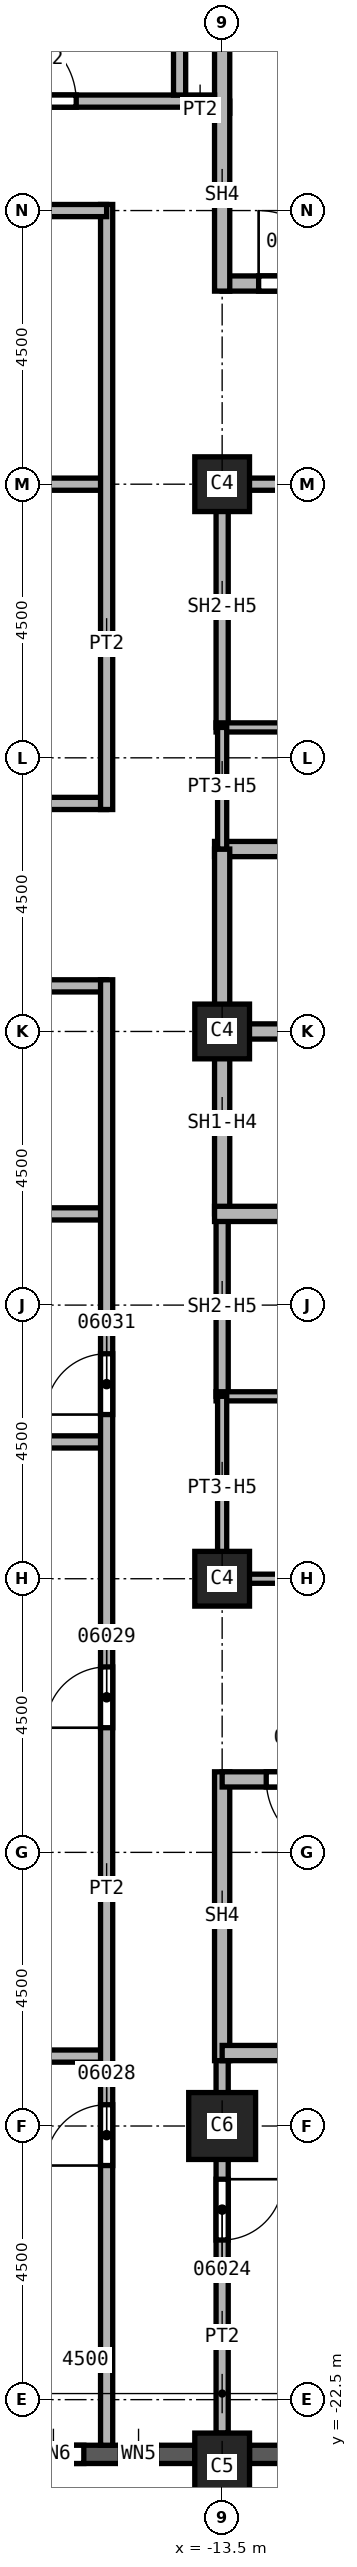
"""IFC4 building model, lengths in metres.
Left out: names, types, materials, properties, quantities, classifications, styles, units other than length and angle.
Written with IfcOpenShell. Run it as: python <this file> out.ifc"""

import sys

from ifc_helpers import new_model, si_unit, direction, frame, frame_2d, origin, origin_2d, place, context, subcontext, project, spatial, rectangle, extrude, element, fill, save


model = new_model("IFC4")
c1 = context("Model", 3, precision=1e-05, world=origin(), true_north=direction((0.0, 1.0)))
c2 = subcontext(c1, "Body", "Model", "MODEL_VIEW")
j1 = project(units=[si_unit("LENGTHUNIT", "METRE"), si_unit("PLANEANGLEUNIT", "RADIAN")], contexts=[c1])
p1 = place(None, origin())
s1 = spatial("IfcSite", under=j1, at=p1, CompositionType="ELEMENT")
p2 = place(p1, origin())
s2 = spatial("IfcBuilding", under=s1, at=p2, CompositionType="ELEMENT")
p3 = place(p2, frame((0.0, 0.0, 126.0)))
s3 = spatial("IfcBuildingStorey", under=s2, at=p3, CompositionType="ELEMENT", Elevation=126.0)
p4 = place(p3, frame((-13.5, -18.0, 0.0), z_axis=(0.0, 0.0, 1.0), x_axis=(1.0, 0.0, 0.0)))
e1 = element("IfcColumn", 1, at=p4, inside=s3, PredefinedType="COLUMN", context=c2, shape_type="SweptSolid", body=[
    extrude(rectangle(XDim=1.1, YDim=1.1, at=origin_2d()), origin(), (0.0, 0.0, 1.0), 3.7),
])
for number, where, z_axis, x_axis in (
    (2, (-13.5, 0.0, 0.0), (0.0, 0.0, 1.0), (1.0, 0.0, 0.0)),
    (3, (-13.5, 9.0, 0.0), (0.0, 0.0, 1.0), (1.0, 0.0, 0.0)),
    (4, (-13.5, -9.0, 0.0), (0.0, 0.0, 1.0), (1.0, 0.0, 0.0)),
):
    element("IfcColumn", number, at=place(p3, frame(where, z_axis=z_axis, x_axis=x_axis)), inside=s3, PredefinedType="COLUMN", context=c2, shape_type="SweptSolid", body=[
        extrude(rectangle(XDim=0.9, YDim=0.9, at=origin_2d()), origin(), (0.0, 0.0, 1.0), 3.7),
    ])
p5 = place(p3, frame((-13.5, -23.6, 0.0), z_axis=(0.0, 0.0, 1.0), x_axis=(1.0, 0.0, 0.0)))
e5 = element("IfcColumn", 5, at=p5, inside=s3, PredefinedType="COLUMN", context=c2, shape_type="SweptSolid", body=[
    extrude(rectangle(XDim=0.9, YDim=1.1, at=origin_2d()), origin(), (0.0, 0.0, 1.0), 3.7),
])
p6 = place(p3, frame((-17.55, -23.4, 0.0), z_axis=(0.0, 0.0, 1.0), x_axis=(1.0, 0.0, 0.0)))
e6 = element("IfcWall", 6, at=p6, inside=s3, PredefinedType="SOLIDWALL", context=c2, shape_type="SweptSolid", body=[
    extrude(rectangle(XDim=3.6, YDim=0.3, at=frame_2d((1.8, 0.0))), origin(), (0.0, 0.0, 1.0), 3.1),
])
p7 = place(p6, frame((0.775, 0.0, 0.8)))
e7 = element("IfcOpeningElement", 7, at=p7, cuts=e6, PredefinedType="OPENING", context=c2, shape_type="SweptSolid", body=[
    extrude(rectangle(XDim=1.0, YDim=1.95, at=frame_2d((0.5, 0.975))), frame((0.0, 0.15, 0.0), z_axis=(0.0, -1.0, 0.0), x_axis=(1.0, 0.0, 0.0)), (0.0, 0.0, 1.0), 0.3),
])
p8 = place(p6, frame((2.375, 0.0, 0.8)))
e8 = element("IfcOpeningElement", 8, at=p8, cuts=e6, PredefinedType="OPENING", context=c2, shape_type="SweptSolid", body=[
    extrude(rectangle(XDim=0.6, YDim=1.95, at=frame_2d((0.3, 0.975))), frame((0.0, 0.15, 0.0), z_axis=(0.0, -1.0, 0.0), x_axis=(1.0, 0.0, 0.0)), (0.0, 0.0, 1.0), 0.3),
])
p9 = place(p3, frame((-13.05, -23.4, 0.0), z_axis=(0.0, 0.0, 1.0), x_axis=(1.0, 0.0, 0.0)))
e9 = element("IfcWall", 9, at=p9, inside=s3, PredefinedType="SOLIDWALL", context=c2, shape_type="SweptSolid", body=[
    extrude(rectangle(XDim=3.6, YDim=0.3, at=frame_2d((1.8, 0.0))), origin(), (0.0, 0.0, 1.0), 3.1),
])
p10 = place(p9, frame((0.6, 0.0, 0.8)))
e10 = element("IfcOpeningElement", 10, at=p10, cuts=e9, PredefinedType="OPENING", context=c2, shape_type="SweptSolid", body=[
    extrude(rectangle(XDim=2.4, YDim=1.95, at=frame_2d((1.2, 0.975))), frame((0.0, 0.15, 0.0), z_axis=(0.0, -1.0, 0.0), x_axis=(1.0, 0.0, 0.0)), (0.0, 0.0, 1.0), 0.3),
])
p11 = place(p3, frame((-33.85, 3.75, 0.0), z_axis=(0.0, 0.0, 1.0), x_axis=(1.0, 0.0, 0.0)))
e11 = element("IfcWall", 11, at=p11, inside=s3, PredefinedType="PARTITIONING", context=c2, shape_type="SweptSolid", body=[
    extrude(rectangle(XDim=18.45, YDim=0.2, at=frame_2d((9.225, 0.0))), origin(), (0.0, 0.0, 1.0), 3.7),
])
p12 = place(p11, frame((9.4, 0.0, 0.0)))
e12 = element("IfcOpeningElement", 12, at=p12, cuts=e11, PredefinedType="OPENING", context=c2, shape_type="SweptSolid", body=[
    extrude(rectangle(XDim=1.0, YDim=2.1, at=frame_2d((0.5, 1.05))), frame((0.0, 0.1, 0.0), z_axis=(0.0, -1.0, 0.0), x_axis=(1.0, 0.0, 0.0)), (0.0, 0.0, 1.0), 0.2),
])
p13 = place(p3, frame((-15.4, 0.75, 0.0), z_axis=(0.0, 0.0, 1.0), x_axis=(-1.0, 0.0, 0.0)))
e13 = element("IfcWall", 13, at=p13, inside=s3, PredefinedType="PARTITIONING", context=c2, shape_type="SweptSolid", body=[
    extrude(rectangle(XDim=18.45, YDim=0.2, at=frame_2d((9.225, 0.0))), origin(), (0.0, 0.0, 1.0), 3.7),
])
p14 = place(p13, frame((3.55, 0.0, 0.0)))
e14 = element("IfcOpeningElement", 14, at=p14, cuts=e13, PredefinedType="OPENING", context=c2, shape_type="SweptSolid", body=[
    extrude(rectangle(XDim=1.0, YDim=2.1, at=frame_2d((0.5, 1.05))), frame((0.0, 0.1, 0.0), z_axis=(0.0, -1.0, 0.0), x_axis=(1.0, 0.0, 0.0)), (0.0, 0.0, 1.0), 0.2),
])
p15 = place(p13, frame((14.9, 0.0, 0.0)))
e15 = element("IfcOpeningElement", 15, at=p15, cuts=e13, PredefinedType="OPENING", context=c2, shape_type="SweptSolid", body=[
    extrude(rectangle(XDim=1.0, YDim=2.1, at=frame_2d((0.5, 1.05))), frame((0.0, 0.1, 0.0), z_axis=(0.0, -1.0, 0.0), x_axis=(1.0, 0.0, 0.0)), (0.0, 0.0, 1.0), 0.2),
])
for number, where, z_axis, x_axis in (
    (16, (-27.1, -6.75, 0.0), (0.0, 0.0, 1.0), (1.0, 0.0, 0.0)),
    (17, (-27.1, -3.0, 0.0), (0.0, 0.0, 1.0), (1.0, 0.0, 0.0)),
    (18, (-27.1, 9.0, 0.0), (0.0, 0.0, 1.0), (1.0, 0.0, 0.0)),
):
    element("IfcWall", number, at=place(p3, frame(where, z_axis=z_axis, x_axis=x_axis)), inside=s3, PredefinedType="PARTITIONING", context=c2, shape_type="SweptSolid", body=[
        extrude(rectangle(XDim=11.7, YDim=0.2, at=frame_2d((5.85, 0.0))), origin(), (0.0, 0.0, 1.0), 3.7),
    ])
p16 = place(p3, frame((-20.0, -16.85, 0.0), z_axis=(0.0, 0.0, 1.0), x_axis=(1.0, 0.0, 0.0)))
e19 = element("IfcWall", 19, at=p16, inside=s3, PredefinedType="PARTITIONING", context=c2, shape_type="SweptSolid", body=[
    extrude(rectangle(XDim=4.6, YDim=0.2, at=frame_2d((2.3, 0.0))), origin(), (0.0, 0.0, 1.0), 3.7),
])
p17 = place(p3, frame((-15.4, -23.25, 0.0), z_axis=(0.0, 0.0, 1.0), x_axis=(0.0, 1.0, 0.0)))
e20 = element("IfcWall", 20, at=p17, inside=s3, PredefinedType="PARTITIONING", context=c2, shape_type="SweptSolid", body=[
    extrude(rectangle(XDim=24.1, YDim=0.2, at=frame_2d((12.05, 0.0))), origin(), (0.0, 0.0, 1.0), 3.7),
])
p18 = place(p17, frame((4.6, 0.0, 0.0)))
e21 = element("IfcOpeningElement", 21, at=p18, cuts=e20, PredefinedType="OPENING", context=c2, shape_type="SweptSolid", body=[
    extrude(rectangle(XDim=1.0, YDim=2.1, at=frame_2d((0.5, 1.05))), frame((0.0, 0.1, 0.0), z_axis=(0.0, -1.0, 0.0), x_axis=(1.0, 0.0, 0.0)), (0.0, 0.0, 1.0), 0.2),
])
p19 = place(p17, frame((11.8, 0.0, 0.0)))
e22 = element("IfcOpeningElement", 22, at=p19, cuts=e20, PredefinedType="OPENING", context=c2, shape_type="SweptSolid", body=[
    extrude(rectangle(XDim=1.0, YDim=2.1, at=frame_2d((0.5, 1.05))), frame((0.0, 0.1, 0.0), z_axis=(0.0, -1.0, 0.0), x_axis=(1.0, 0.0, 0.0)), (0.0, 0.0, 1.0), 0.2),
])
p20 = place(p17, frame((16.95, 0.0, 0.0)))
e23 = element("IfcOpeningElement", 23, at=p20, cuts=e20, PredefinedType="OPENING", context=c2, shape_type="SweptSolid", body=[
    extrude(rectangle(XDim=1.0, YDim=2.1, at=frame_2d((0.5, 1.05))), frame((0.0, 0.1, 0.0), z_axis=(0.0, -1.0, 0.0), x_axis=(1.0, 0.0, 0.0)), (0.0, 0.0, 1.0), 0.2),
])
p21 = place(p3, frame((-15.4, 3.65, 0.0), z_axis=(0.0, 0.0, 1.0), x_axis=(0.0, 1.0, 0.0)))
e24 = element("IfcWall", 24, at=p21, inside=s3, PredefinedType="PARTITIONING", context=c2, shape_type="SweptSolid", body=[
    extrude(rectangle(XDim=9.95, YDim=0.2, at=frame_2d((4.975, 0.0))), origin(), (0.0, 0.0, 1.0), 3.7),
])
p22 = place(p3, frame((-15.4, 13.5, 0.0), z_axis=(0.0, 0.0, 1.0), x_axis=(-1.0, 0.0, 0.0)))
e25 = element("IfcWall", 25, at=p22, inside=s3, PredefinedType="PARTITIONING", context=c2, shape_type="SweptSolid", body=[
    extrude(rectangle(XDim=6.6, YDim=0.2, at=frame_2d((3.3, 0.0))), origin(), (0.0, 0.0, 1.0), 3.7),
])
p23 = place(p22, frame((5.35, 0.0, 0.0)))
e26 = element("IfcOpeningElement", 26, at=p23, cuts=e25, PredefinedType="OPENING", context=c2, shape_type="SweptSolid", body=[
    extrude(rectangle(XDim=1.0, YDim=2.1, at=frame_2d((0.5, 1.05))), frame((0.0, 0.1, 0.0), z_axis=(0.0, -1.0, 0.0), x_axis=(1.0, 0.0, 0.0)), (0.0, 0.0, 1.0), 0.2),
])
p24 = place(p3, frame((-14.1, 15.2, 0.0), z_axis=(0.0, 0.0, 1.0), x_axis=(1.0, 0.0, 0.0)))
e27 = element("IfcWall", 27, at=p24, inside=s3, PredefinedType="PARTITIONING", context=c2, shape_type="SweptSolid", body=[
    extrude(rectangle(XDim=0.725, YDim=0.2, at=frame_2d((0.363, 0.0))), origin(), (0.0, 0.0, 1.0), 3.7),
])
p25 = place(p3, frame((-13.5, -16.675, 0.0), z_axis=(0.0, 0.0, 1.0), x_axis=(0.0, -1.0, 0.0)))
e28 = element("IfcWall", 28, at=p25, inside=s3, PredefinedType="PARTITIONING", context=c2, shape_type="SweptSolid", body=[
    extrude(rectangle(XDim=6.375, YDim=0.2, at=frame_2d((3.188, 0.0))), origin(), (0.0, 0.0, 1.0), 3.7),
])
p26 = place(p25, frame((2.2, 0.0, 0.0)))
e29 = element("IfcOpeningElement", 29, at=p26, cuts=e28, PredefinedType="OPENING", context=c2, shape_type="SweptSolid", body=[
    extrude(rectangle(XDim=1.0, YDim=2.1, at=frame_2d((0.5, 1.05))), frame((0.0, 0.1, 0.0), z_axis=(0.0, -1.0, 0.0), x_axis=(1.0, 0.0, 0.0)), (0.0, 0.0, 1.0), 0.2),
])
p27 = place(p3, frame((-13.5, -6.0, 0.0), z_axis=(0.0, 0.0, 1.0), x_axis=(0.0, 1.0, 0.0)))
e30 = element("IfcWall", 30, at=p27, inside=s3, PredefinedType="SOLIDWALL", context=c2, shape_type="SweptSolid", body=[
    extrude(rectangle(XDim=3.0, YDim=0.2, at=frame_2d((1.5, 0.0))), origin(), (0.0, 0.0, 1.0), 2.938),
])
p28 = place(p3, frame((-13.5, 5.0, 0.0), z_axis=(0.0, 0.0, 1.0), x_axis=(0.0, 1.0, 0.0)))
e31 = element("IfcWall", 31, at=p28, inside=s3, PredefinedType="SOLIDWALL", context=c2, shape_type="SweptSolid", body=[
    extrude(rectangle(XDim=4.1, YDim=0.2, at=frame_2d((2.05, 0.0))), origin(), (0.0, 0.0, 1.0), 2.938),
])
p29 = place(p3, frame((-13.5, 9.0, 0.0), z_axis=(0.0, 0.0, 1.0), x_axis=(1.0, 0.0, 0.0)))
e32 = element("IfcWall", 32, at=p29, inside=s3, PredefinedType="SOLIDWALL", context=c2, shape_type="SweptSolid", body=[
    extrude(rectangle(XDim=3.0, YDim=0.2, at=frame_2d((1.5, 0.0))), origin(), (0.0, 0.0, 1.0), 2.938),
])
p30 = place(p3, frame((-13.625, 0.0, 0.0), z_axis=(0.0, 0.0, 1.0), x_axis=(1.0, 0.0, 0.0)))
e33 = element("IfcWall", 33, at=p30, inside=s3, PredefinedType="SOLIDWALL", context=c2, shape_type="SweptSolid", body=[
    extrude(rectangle(XDim=3.125, YDim=0.25, at=frame_2d((1.562, 0.0))), origin(), (0.0, 0.0, 1.0), 3.7),
])
p31 = place(p3, frame((-13.625, 3.0, 0.0), z_axis=(0.0, 0.0, 1.0), x_axis=(1.0, 0.0, 0.0)))
e34 = element("IfcWall", 34, at=p31, inside=s3, PredefinedType="SOLIDWALL", context=c2, shape_type="SweptSolid", body=[
    extrude(rectangle(XDim=6.125, YDim=0.25, at=frame_2d((3.062, 0.0))), origin(), (0.0, 0.0, 1.0), 3.7),
])
p32 = place(p31, frame((3.25, 0.0, 0.0)))
e35 = element("IfcOpeningElement", 35, at=p32, cuts=e34, PredefinedType="OPENING", context=c2, shape_type="SweptSolid", body=[
    extrude(rectangle(XDim=1.1, YDim=2.1, at=frame_2d((0.55, 1.05))), frame((0.0, 0.125, 0.0), z_axis=(0.0, -1.0, 0.0), x_axis=(1.0, 0.0, 0.0)), (0.0, 0.0, 1.0), 0.25),
])
p33 = place(p3, frame((-13.5, -3.0, 0.0), z_axis=(0.0, 0.0, 1.0), x_axis=(0.0, 1.0, 0.0)))
e36 = element("IfcWall", 36, at=p33, inside=s3, PredefinedType="SOLIDWALL", context=c2, shape_type="SweptSolid", body=[
    extrude(rectangle(XDim=6.0, YDim=0.25, at=frame_2d((3.0, 0.0))), origin(), (0.0, 0.0, 1.0), 2.938),
])
p34 = place(p3, frame((-13.625, -3.0, 0.0), z_axis=(0.0, 0.0, 1.0), x_axis=(1.0, 0.0, 0.0)))
e37 = element("IfcWall", 37, at=p34, inside=s3, PredefinedType="SOLIDWALL", context=c2, shape_type="SweptSolid", body=[
    extrude(rectangle(XDim=9.25, YDim=0.25, at=frame_2d((4.625, 0.0))), origin(), (0.0, 0.0, 1.0), 3.7),
])
p35 = place(p34, frame((3.25, 0.0, 0.0)))
e38 = element("IfcOpeningElement", 38, at=p35, cuts=e37, PredefinedType="OPENING", context=c2, shape_type="SweptSolid", body=[
    extrude(rectangle(XDim=1.1, YDim=2.1, at=frame_2d((0.55, 1.05))), frame((0.0, 0.125, 0.0), z_axis=(0.0, -1.0, 0.0), x_axis=(1.0, 0.0, 0.0)), (0.0, 0.0, 1.0), 0.25),
])
p36 = place(p3, frame((-13.5, -12.175, 0.0), z_axis=(0.0, 0.0, 1.0), x_axis=(0.0, -1.0, 0.0)))
e39 = element("IfcWall", 39, at=p36, inside=s3, PredefinedType="SOLIDWALL", context=c2, shape_type="SweptSolid", body=[
    extrude(rectangle(XDim=4.75, YDim=0.25, at=frame_2d((2.375, 0.0))), origin(), (0.0, 0.0, 1.0), 3.7),
])
p37 = place(p3, frame((-13.5, 12.3, 0.0), z_axis=(0.0, 0.0, 1.0), x_axis=(1.0, 0.0, 0.0)))
e40 = element("IfcWall", 40, at=p37, inside=s3, PredefinedType="SOLIDWALL", context=c2, shape_type="SweptSolid", body=[
    extrude(rectangle(XDim=9.125, YDim=0.25, at=frame_2d((4.562, 0.0))), origin(), (0.0, 0.0, 1.0), 3.7),
])
p38 = place(p37, frame((0.6, 0.0, 0.0)))
e41 = element("IfcOpeningElement", 41, at=p38, cuts=e40, PredefinedType="OPENING", context=c2, shape_type="SweptSolid", body=[
    extrude(rectangle(XDim=1.2, YDim=2.1, at=frame_2d((0.6, 1.05))), frame((0.0, 0.125, 0.0), z_axis=(0.0, -1.0, 0.0), x_axis=(1.0, 0.0, 0.0)), (0.0, 0.0, 1.0), 0.25),
])
p39 = place(p3, frame((-13.5, 12.175, 0.0), z_axis=(0.0, 0.0, 1.0), x_axis=(0.0, 1.0, 0.0)))
e42 = element("IfcWall", 42, at=p39, inside=s3, PredefinedType="SOLIDWALL", context=c2, shape_type="SweptSolid", body=[
    extrude(rectangle(XDim=4.75, YDim=0.25, at=frame_2d((2.375, 0.0))), origin(), (0.0, 0.0, 1.0), 3.7),
])
p40 = place(p3, frame((-4.5, -16.8, 0.0), z_axis=(0.0, 0.0, 1.0), x_axis=(-1.0, 0.0, 0.0)))
e43 = element("IfcWall", 43, at=p40, inside=s3, PredefinedType="SOLIDWALL", context=c2, shape_type="SweptSolid", body=[
    extrude(rectangle(XDim=9.0, YDim=0.25, at=frame_2d((4.5, 0.0))), origin(), (0.0, 0.0, 1.0), 3.7),
])
p41 = place(p3, frame((-4.375, -12.3, 0.0), z_axis=(0.0, 0.0, 1.0), x_axis=(-1.0, 0.0, 0.0)))
e44 = element("IfcWall", 44, at=p41, inside=s3, PredefinedType="SOLIDWALL", context=c2, shape_type="SweptSolid", body=[
    extrude(rectangle(XDim=9.125, YDim=0.25, at=frame_2d((4.562, 0.0))), origin(), (0.0, 0.0, 1.0), 3.7),
])
p42 = place(p41, frame((7.2, 0.0, 0.0)))
e45 = element("IfcOpeningElement", 45, at=p42, cuts=e44, PredefinedType="OPENING", context=c2, shape_type="SweptSolid", body=[
    extrude(rectangle(XDim=1.2, YDim=2.1, at=frame_2d((0.6, 1.05))), frame((0.0, 0.125, 0.0), z_axis=(0.0, -1.0, 0.0), x_axis=(1.0, 0.0, 0.0)), (0.0, 0.0, 1.0), 0.25),
])
for number, where, z_axis, x_axis in (
    (46, (-13.6, -6.0, 0.0), (0.0, 0.0, 1.0), (1.0, 0.0, 0.0)),
    (47, (-13.6, 5.0, 0.0), (0.0, 0.0, 1.0), (1.0, 0.0, 0.0)),
):
    element("IfcWall", number, at=place(p3, frame(where, z_axis=z_axis, x_axis=x_axis)), inside=s3, PredefinedType="PARTITIONING", context=c2, shape_type="SweptSolid", body=[
        extrude(rectangle(XDim=3.1, YDim=0.15, at=frame_2d((1.55, 0.0))), origin(), (0.0, 0.0, 1.0), 3.7),
    ])
p43 = place(p3, frame((-13.5, -9.075, 0.0), z_axis=(0.0, 0.0, 1.0), x_axis=(0.0, 1.0, 0.0)))
e48 = element("IfcWall", 48, at=p43, inside=s3, PredefinedType="PARTITIONING", context=c2, shape_type="SweptSolid", body=[
    extrude(rectangle(XDim=3.075, YDim=0.15, at=frame_2d((1.538, 0.0))), origin(), (0.0, 0.0, 1.0), 2.938),
])
p44 = place(p3, frame((-13.5, 3.0, 0.0), z_axis=(0.0, 0.0, 1.0), x_axis=(0.0, 1.0, 0.0)))
e49 = element("IfcWall", 49, at=p44, inside=s3, PredefinedType="PARTITIONING", context=c2, shape_type="SweptSolid", body=[
    extrude(rectangle(XDim=2.0, YDim=0.15, at=frame_2d((1.0, 0.0))), origin(), (0.0, 0.0, 1.0), 2.938),
])
p45 = place(p3, frame((-10.5, -9.0, 0.0), z_axis=(0.0, 0.0, 1.0), x_axis=(-1.0, 0.0, 0.0)))
e50 = element("IfcWall", 50, at=p45, inside=s3, PredefinedType="PARTITIONING", context=c2, shape_type="SweptSolid", body=[
    extrude(rectangle(XDim=3.0, YDim=0.15, at=frame_2d((1.5, 0.0))), origin(), (0.0, 0.0, 1.0), 2.938),
])
p46 = place(p3, frame((-21.9, 15.3, 0.0), z_axis=(0.0, 0.0, 1.0), x_axis=(1.0, 0.0, 0.0)))
e51 = element("IfcWall", 51, at=p46, inside=s3, PredefinedType="SOLIDWALL", context=c2, shape_type="SweptSolid", body=[
    extrude(rectangle(XDim=8.275, YDim=0.2, at=frame_2d((4.137, 0.0))), origin(), (0.0, 0.0, 1.0), 3.7),
])
p47 = place(p46, frame((4.8, 0.0, 0.0)))
e52 = element("IfcOpeningElement", 52, at=p47, cuts=e51, PredefinedType="OPENING", context=c2, shape_type="SweptSolid", body=[
    extrude(rectangle(XDim=1.2, YDim=2.1, at=frame_2d((0.6, 1.05))), frame((0.0, 0.1, 0.0), z_axis=(0.0, -1.0, 0.0), x_axis=(1.0, 0.0, 0.0)), (0.0, 0.0, 1.0), 0.2),
])
p48 = place(p3, frame((-14.2, 15.4, 0.0), z_axis=(0.0, 0.0, 1.0), x_axis=(0.0, 1.0, 0.0)))
e53 = element("IfcWall", 53, at=p48, inside=s3, PredefinedType="SOLIDWALL", context=c2, shape_type="SweptSolid", body=[
    extrude(rectangle(XDim=5.9, YDim=0.2, at=frame_2d((2.95, 0.0))), origin(), (0.0, 0.0, 1.0), 3.7),
])
p49 = place(p38, origin())
e54 = element("IfcDoor", 54, at=p49, inside=s3, OperationType="SINGLE_SWING_RIGHT", PredefinedType="DOOR", context=c2, shape_type="SweptSolid", body=[
    extrude(rectangle(XDim=1.2, YDim=2.1, at=frame_2d((0.6, 1.05))), frame((0.0, 0.025, 0.0), z_axis=(0.0, -1.0, 0.0), x_axis=(1.0, 0.0, 0.0)), (0.0, 0.0, 1.0), 0.05),
])
fill(e41, e54)
p50 = place(p42, origin())
e55 = element("IfcDoor", 55, at=p50, inside=s3, OperationType="SINGLE_SWING_LEFT", PredefinedType="DOOR", context=c2, shape_type="SweptSolid", body=[
    extrude(rectangle(XDim=1.2, YDim=2.1, at=frame_2d((0.6, 1.05))), frame((0.0, 0.025, 0.0), z_axis=(0.0, -1.0, 0.0), x_axis=(1.0, 0.0, 0.0)), (0.0, 0.0, 1.0), 0.05),
])
fill(e45, e55)
p51 = place(p26, origin())
e56 = element("IfcDoor", 56, at=p51, inside=s3, OperationType="SINGLE_SWING_LEFT", PredefinedType="DOOR", context=c2, shape_type="SweptSolid", body=[
    extrude(rectangle(XDim=1.0, YDim=2.1, at=frame_2d((0.5, 1.05))), frame((0.0, 0.025, 0.0), z_axis=(0.0, -1.0, 0.0), x_axis=(1.0, 0.0, 0.0)), (0.0, 0.0, 1.0), 0.05),
])
fill(e29, e56)
p52 = place(p18, origin())
e57 = element("IfcDoor", 57, at=p52, inside=s3, OperationType="SINGLE_SWING_LEFT", PredefinedType="DOOR", context=c2, shape_type="SweptSolid", body=[
    extrude(rectangle(XDim=1.0, YDim=2.1, at=frame_2d((0.5, 1.05))), frame((0.0, 0.025, 0.0), z_axis=(0.0, -1.0, 0.0), x_axis=(1.0, 0.0, 0.0)), (0.0, 0.0, 1.0), 0.05),
])
fill(e21, e57)
p53 = place(p19, origin())
e58 = element("IfcDoor", 58, at=p53, inside=s3, OperationType="SINGLE_SWING_RIGHT", PredefinedType="DOOR", context=c2, shape_type="SweptSolid", body=[
    extrude(rectangle(XDim=1.0, YDim=2.1, at=frame_2d((0.5, 1.05))), frame((0.0, 0.025, 0.0), z_axis=(0.0, -1.0, 0.0), x_axis=(1.0, 0.0, 0.0)), (0.0, 0.0, 1.0), 0.05),
])
fill(e22, e58)
p54 = place(p20, origin())
e59 = element("IfcDoor", 59, at=p54, inside=s3, OperationType="SINGLE_SWING_RIGHT", PredefinedType="DOOR", context=c2, shape_type="SweptSolid", body=[
    extrude(rectangle(XDim=1.0, YDim=2.1, at=frame_2d((0.5, 1.05))), frame((0.0, 0.025, 0.0), z_axis=(0.0, -1.0, 0.0), x_axis=(1.0, 0.0, 0.0)), (0.0, 0.0, 1.0), 0.05),
])
fill(e23, e59)
p55 = place(p47, origin())
e60 = element("IfcDoor", 60, at=p55, inside=s3, OperationType="SINGLE_SWING_RIGHT", PredefinedType="DOOR", context=c2, shape_type="SweptSolid", body=[
    extrude(rectangle(XDim=1.2, YDim=2.1, at=frame_2d((0.6, 1.05))), frame((0.0, 0.025, 0.0), z_axis=(0.0, -1.0, 0.0), x_axis=(1.0, 0.0, 0.0)), (0.0, 0.0, 1.0), 0.05),
])
fill(e52, e60)
p56 = place(p7, origin())
e61 = element("IfcWindow", 61, at=p56, inside=s3, PartitioningType="SINGLE_PANEL", PredefinedType="WINDOW", context=c2, shape_type="SweptSolid", body=[
    extrude(rectangle(XDim=1.0, YDim=1.95, at=frame_2d((0.5, 0.975))), frame((0.0, 0.03, 0.0), z_axis=(0.0, -1.0, 0.0), x_axis=(1.0, 0.0, 0.0)), (0.0, 0.0, 1.0), 0.06),
])
fill(e7, e61)
p57 = place(p8, origin())
e62 = element("IfcWindow", 62, at=p57, inside=s3, PartitioningType="SINGLE_PANEL", PredefinedType="WINDOW", context=c2, shape_type="SweptSolid", body=[
    extrude(rectangle(XDim=0.6, YDim=1.95, at=frame_2d((0.3, 0.975))), frame((0.0, 0.03, 0.0), z_axis=(0.0, -1.0, 0.0), x_axis=(1.0, 0.0, 0.0)), (0.0, 0.0, 1.0), 0.06),
])
fill(e8, e62)
save(model, sys.argv[1])
